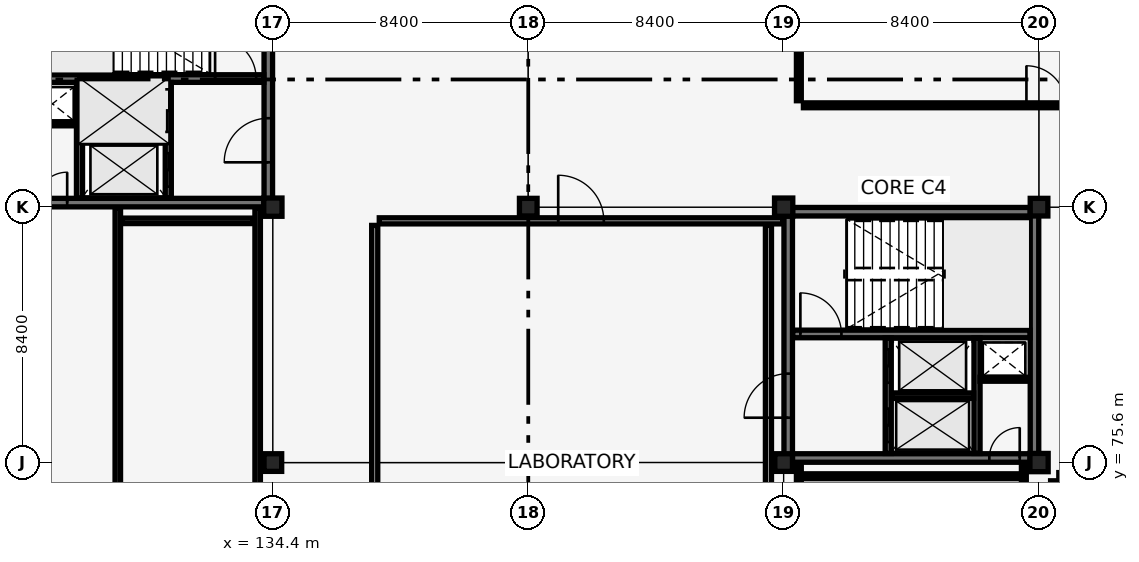
"""IFC4 building model, lengths in metres.
Left out: names, types, materials, properties, quantities, classifications, styles, units other than length and angle.
Written with IfcOpenShell. Run it as: python <this file> out.ifc"""

import sys

from ifc_helpers import new_model, si_unit, direction, frame, frame_2d, origin, origin_2d, place, context, subcontext, project, spatial, rectangle, extrude, element, fill, save


model = new_model("IFC4")
c1 = context("Model", 3, precision=1e-05, world=origin(), true_north=direction((0.0, 1.0)))
c2 = subcontext(c1, "Body", "Model", "MODEL_VIEW")
j1 = project(units=[si_unit("LENGTHUNIT", "METRE"), si_unit("PLANEANGLEUNIT", "RADIAN")], contexts=[c1])
p1 = place(None, origin())
s1 = spatial("IfcSite", under=j1, at=p1, CompositionType="ELEMENT")
p2 = place(p1, origin())
s2 = spatial("IfcBuilding", under=s1, at=p2, CompositionType="ELEMENT")
p3 = place(p2, frame((0.0, 0.0, 18.02)))
s3 = spatial("IfcBuildingStorey", under=s2, at=p3, CompositionType="ELEMENT", Elevation=18.02)
p4 = place(p3, frame((126.15, 84.15, 0.0), z_axis=(0.0, 0.0, 1.0), x_axis=(1.0, 0.0, 0.0)))
e1 = element("IfcWall", 1, at=p4, inside=s3, PredefinedType="SHEAR", context=c2, shape_type="SweptSolid", body=[
    extrude(rectangle(XDim=8.1, YDim=0.28, at=frame_2d((4.05, 0.0))), origin(), (0.0, 0.0, 1.0), 3.78),
])
p5 = place(p4, frame((0.485, 0.0, 0.0)))
e2 = element("IfcOpeningElement", 2, at=p5, cuts=e1, PredefinedType="OPENING", context=c2, shape_type="SweptSolid", body=[
    extrude(rectangle(XDim=1.0, YDim=2.15, at=frame_2d((0.5, 1.075))), frame((0.0, 0.15, 0.0), z_axis=(0.0, -1.0, 0.0), x_axis=(1.0, 0.0, 0.0)), (0.0, 0.0, 1.0), 0.3),
])
p6 = place(p3, frame((134.25, 84.15, 0.0), z_axis=(0.0, 0.0, 1.0), x_axis=(0.0, 1.0, 0.0)))
e3 = element("IfcWall", 3, at=p6, inside=s3, PredefinedType="SHEAR", context=c2, shape_type="SweptSolid", body=[
    extrude(rectangle(XDim=8.1, YDim=0.28, at=frame_2d((4.05, 0.0))), origin(), (0.0, 0.0, 1.0), 3.78),
])
p7 = place(p6, frame((1.325, 0.0, 0.0)))
e4 = element("IfcOpeningElement", 4, at=p7, cuts=e3, PredefinedType="OPENING", context=c2, shape_type="SweptSolid", body=[
    extrude(rectangle(XDim=1.45, YDim=2.15, at=frame_2d((0.725, 1.075))), frame((0.0, 0.15, 0.0), z_axis=(0.0, -1.0, 0.0), x_axis=(1.0, 0.0, 0.0)), (0.0, 0.0, 1.0), 0.3),
])
p8 = place(p3, frame((126.3, 88.23, 0.0), z_axis=(0.0, 0.0, 1.0), x_axis=(1.0, 0.0, 0.0)))
e5 = element("IfcWall", 5, at=p8, inside=s3, PredefinedType="SHEAR", context=c2, shape_type="SweptSolid", body=[
    extrude(rectangle(XDim=7.8, YDim=0.25, at=frame_2d((3.9, 0.0))), origin(), (0.0, 0.0, 1.0), 3.78),
])
p9 = place(p8, frame((6.2, 0.0, 0.0)))
e6 = element("IfcOpeningElement", 6, at=p9, cuts=e5, PredefinedType="OPENING", context=c2, shape_type="SweptSolid", body=[
    extrude(rectangle(XDim=1.35, YDim=2.15, at=frame_2d((0.675, 1.075))), frame((0.0, 0.135, 0.0), z_axis=(0.0, -1.0, 0.0), x_axis=(1.0, 0.0, 0.0)), (0.0, 0.0, 1.0), 0.27),
])
p10 = place(p3, frame((151.35, 75.75, 0.0), z_axis=(0.0, 0.0, 1.0), x_axis=(1.0, 0.0, 0.0)))
e7 = element("IfcWall", 7, at=p10, inside=s3, PredefinedType="SHEAR", context=c2, shape_type="SweptSolid", body=[
    extrude(rectangle(XDim=8.1, YDim=0.28, at=frame_2d((4.05, 0.0))), origin(), (0.0, 0.0, 1.0), 3.78),
])
p11 = place(p10, frame((6.615, 0.0, 0.0)))
e8 = element("IfcOpeningElement", 8, at=p11, cuts=e7, PredefinedType="OPENING", context=c2, shape_type="SweptSolid", body=[
    extrude(rectangle(XDim=1.0, YDim=2.15, at=frame_2d((0.5, 1.075))), frame((0.0, 0.15, 0.0), z_axis=(0.0, -1.0, 0.0), x_axis=(1.0, 0.0, 0.0)), (0.0, 0.0, 1.0), 0.3),
])
p12 = place(p3, frame((151.35, 83.85, 0.0), z_axis=(0.0, 0.0, 1.0), x_axis=(1.0, 0.0, 0.0)))
e9 = element("IfcWall", 9, at=p12, inside=s3, PredefinedType="SHEAR", context=c2, shape_type="SweptSolid", body=[
    extrude(rectangle(XDim=8.1, YDim=0.28, at=frame_2d((4.05, 0.0))), origin(), (0.0, 0.0, 1.0), 3.78),
])
p13 = place(p3, frame((151.35, 75.75, 0.0), z_axis=(0.0, 0.0, 1.0), x_axis=(0.0, 1.0, 0.0)))
e10 = element("IfcWall", 10, at=p13, inside=s3, PredefinedType="SHEAR", context=c2, shape_type="SweptSolid", body=[
    extrude(rectangle(XDim=8.1, YDim=0.28, at=frame_2d((4.05, 0.0))), origin(), (0.0, 0.0, 1.0), 3.78),
])
p14 = place(p13, frame((1.325, 0.0, 0.0)))
e11 = element("IfcOpeningElement", 11, at=p14, cuts=e10, PredefinedType="OPENING", context=c2, shape_type="SweptSolid", body=[
    extrude(rectangle(XDim=1.45, YDim=2.15, at=frame_2d((0.725, 1.075))), frame((0.0, 0.15, 0.0), z_axis=(0.0, -1.0, 0.0), x_axis=(1.0, 0.0, 0.0)), (0.0, 0.0, 1.0), 0.3),
])
p15 = place(p3, frame((159.45, 75.75, 0.0), z_axis=(0.0, 0.0, 1.0), x_axis=(0.0, 1.0, 0.0)))
e12 = element("IfcWall", 12, at=p15, inside=s3, PredefinedType="SHEAR", context=c2, shape_type="SweptSolid", body=[
    extrude(rectangle(XDim=8.1, YDim=0.28, at=frame_2d((4.05, 0.0))), origin(), (0.0, 0.0, 1.0), 3.78),
])
p16 = place(p3, frame((151.5, 79.83, 0.0), z_axis=(0.0, 0.0, 1.0), x_axis=(1.0, 0.0, 0.0)))
e13 = element("IfcWall", 13, at=p16, inside=s3, PredefinedType="SHEAR", context=c2, shape_type="SweptSolid", body=[
    extrude(rectangle(XDim=7.8, YDim=0.25, at=frame_2d((3.9, 0.0))), origin(), (0.0, 0.0, 1.0), 3.78),
])
p17 = place(p16, frame((0.25, 0.0, 0.0)))
e14 = element("IfcOpeningElement", 14, at=p17, cuts=e13, PredefinedType="OPENING", context=c2, shape_type="SweptSolid", body=[
    extrude(rectangle(XDim=1.35, YDim=2.15, at=frame_2d((0.675, 1.075))), frame((0.0, 0.135, 0.0), z_axis=(0.0, -1.0, 0.0), x_axis=(1.0, 0.0, 0.0)), (0.0, 0.0, 1.0), 0.27),
])
p18 = place(p3, frame((134.4, 75.6, 0.0), z_axis=(0.0, 0.0, 1.0), x_axis=(1.0, 0.0, 0.0)))
e15 = element("IfcColumn", 15, at=p18, inside=s3, PredefinedType="COLUMN", context=c2, shape_type="SweptSolid", body=[
    extrude(rectangle(XDim=0.58, YDim=0.58, at=origin_2d()), origin(), (0.0, 0.0, 1.0), 3.78),
])
for number, where, z_axis, x_axis in (
    (16, (134.4, 84.0, 0.0), (0.0, 0.0, 1.0), (1.0, 0.0, 0.0)),
    (17, (142.8, 75.6, 0.0), (0.0, 0.0, 1.0), (1.0, 0.0, 0.0)),
):
    element("IfcColumn", number, at=place(p3, frame(where, z_axis=z_axis, x_axis=x_axis)), inside=s3, PredefinedType="COLUMN", context=c2, shape_type="SweptSolid", body=[
        extrude(rectangle(XDim=0.6, YDim=0.6, at=origin_2d()), origin(), (0.0, 0.0, 1.0), 3.78),
    ])
for number, where, z_axis, x_axis in (
    (18, (142.8, 84.0, 0.0), (0.0, 0.0, 1.0), (1.0, 0.0, 0.0)),
    (19, (151.2, 75.6, 0.0), (0.0, 0.0, 1.0), (1.0, 0.0, 0.0)),
):
    element("IfcColumn", number, at=place(p3, frame(where, z_axis=z_axis, x_axis=x_axis)), inside=s3, PredefinedType="COLUMN", context=c2, shape_type="SweptSolid", body=[
        extrude(rectangle(XDim=0.58, YDim=0.58, at=origin_2d()), origin(), (0.0, 0.0, 1.0), 3.78),
    ])
for number, where, z_axis, x_axis in (
    (20, (151.2, 84.0, 0.0), (0.0, 0.0, 1.0), (1.0, 0.0, 0.0)),
    (21, (159.6, 75.6, 0.0), (0.0, 0.0, 1.0), (1.0, 0.0, 0.0)),
):
    element("IfcColumn", number, at=place(p3, frame(where, z_axis=z_axis, x_axis=x_axis)), inside=s3, PredefinedType="COLUMN", context=c2, shape_type="SweptSolid", body=[
        extrude(rectangle(XDim=0.6, YDim=0.6, at=origin_2d()), origin(), (0.0, 0.0, 1.0), 3.78),
    ])
p19 = place(p3, frame((159.6, 84.0, 0.0), z_axis=(0.0, 0.0, 1.0), x_axis=(1.0, 0.0, 0.0)))
e22 = element("IfcColumn", 22, at=p19, inside=s3, PredefinedType="COLUMN", context=c2, shape_type="SweptSolid", body=[
    extrude(rectangle(XDim=0.58, YDim=0.58, at=origin_2d()), origin(), (0.0, 0.0, 1.0), 3.78),
])
p20 = place(p3, frame((130.96, 84.3, 0.0), z_axis=(0.0, 0.0, 1.0), x_axis=(0.0, 1.0, 0.0)))
e23 = element("IfcWall", 23, at=p20, inside=s3, PredefinedType="SHEAR", context=c2, shape_type="SweptSolid", body=[
    extrude(rectangle(XDim=3.8, YDim=0.2, at=frame_2d((1.9, 0.0))), origin(), (0.0, 0.0, 1.0), 3.08),
])
p21 = place(p20, frame((0.375, 0.0, 0.0)))
e24 = element("IfcOpeningElement", 24, at=p21, cuts=e23, PredefinedType="OPENING", context=c2, shape_type="SweptSolid", body=[
    extrude(rectangle(XDim=1.1, YDim=2.15, at=frame_2d((0.55, 1.075))), frame((0.0, 0.11, 0.0), z_axis=(0.0, -1.0, 0.0), x_axis=(1.0, 0.0, 0.0)), (0.0, 0.0, 1.0), 0.22),
])
p22 = place(p20, frame((2.175, 0.0, 0.0)))
e25 = element("IfcOpeningElement", 25, at=p22, cuts=e23, PredefinedType="OPENING", context=c2, shape_type="SweptSolid", body=[
    extrude(rectangle(XDim=1.4, YDim=2.2, at=frame_2d((0.7, 1.1))), frame((0.0, 0.11, 0.0), z_axis=(0.0, -1.0, 0.0), x_axis=(1.0, 0.0, 0.0)), (0.0, 0.0, 1.0), 0.22),
])
p23 = place(p3, frame((128.04, 84.3, 0.0), z_axis=(0.0, 0.0, 1.0), x_axis=(0.0, 1.0, 0.0)))
e26 = element("IfcWall", 26, at=p23, inside=s3, PredefinedType="SHEAR", context=c2, shape_type="SweptSolid", body=[
    extrude(rectangle(XDim=3.8, YDim=0.2, at=frame_2d((1.9, 0.0))), origin(), (0.0, 0.0, 1.0), 3.08),
])
p24 = place(p3, frame((128.15, 86.2, 0.0), z_axis=(0.0, 0.0, 1.0), x_axis=(1.0, 0.0, 0.0)))
e27 = element("IfcWall", 27, at=p24, inside=s3, PredefinedType="SHEAR", context=c2, shape_type="SweptSolid", body=[
    extrude(rectangle(XDim=2.7, YDim=0.18, at=frame_2d((1.35, 0.0))), origin(), (0.0, 0.0, 1.0), 3.78),
])
p25 = place(p3, frame((126.32, 86.74, 0.0), z_axis=(0.0, 0.0, 1.0), x_axis=(1.0, 0.0, 0.0)))
e28 = element("IfcWall", 28, at=p25, inside=s3, PredefinedType="PARTITIONING", context=c2, shape_type="SweptSolid", body=[
    extrude(rectangle(XDim=1.62, YDim=0.13, at=frame_2d((0.81, 0.0))), origin(), (0.0, 0.0, 1.0), 3.78),
])
p26 = place(p3, frame((154.64, 75.9, 0.0), z_axis=(0.0, 0.0, 1.0), x_axis=(0.0, 1.0, 0.0)))
e29 = element("IfcWall", 29, at=p26, inside=s3, PredefinedType="SHEAR", context=c2, shape_type="SweptSolid", body=[
    extrude(rectangle(XDim=3.8, YDim=0.2, at=frame_2d((1.9, 0.0))), origin(), (0.0, 0.0, 1.0), 3.78),
])
p27 = place(p26, frame((0.375, 0.0, 0.0)))
e30 = element("IfcOpeningElement", 30, at=p27, cuts=e29, PredefinedType="OPENING", context=c2, shape_type="SweptSolid", body=[
    extrude(rectangle(XDim=1.1, YDim=2.15, at=frame_2d((0.55, 1.075))), frame((0.0, 0.11, 0.0), z_axis=(0.0, -1.0, 0.0), x_axis=(1.0, 0.0, 0.0)), (0.0, 0.0, 1.0), 0.22),
])
p28 = place(p26, frame((2.325, 0.0, 0.0)))
e31 = element("IfcOpeningElement", 31, at=p28, cuts=e29, PredefinedType="OPENING", context=c2, shape_type="SweptSolid", body=[
    extrude(rectangle(XDim=1.1, YDim=2.15, at=frame_2d((0.55, 1.075))), frame((0.0, 0.11, 0.0), z_axis=(0.0, -1.0, 0.0), x_axis=(1.0, 0.0, 0.0)), (0.0, 0.0, 1.0), 0.22),
])
p29 = place(p3, frame((157.56, 75.9, 0.0), z_axis=(0.0, 0.0, 1.0), x_axis=(0.0, 1.0, 0.0)))
e32 = element("IfcWall", 32, at=p29, inside=s3, PredefinedType="SHEAR", context=c2, shape_type="SweptSolid", body=[
    extrude(rectangle(XDim=3.8, YDim=0.2, at=frame_2d((1.9, 0.0))), origin(), (0.0, 0.0, 1.0), 3.78),
])
p30 = place(p3, frame((154.75, 77.8, 0.0), z_axis=(0.0, 0.0, 1.0), x_axis=(1.0, 0.0, 0.0)))
e33 = element("IfcWall", 33, at=p30, inside=s3, PredefinedType="SHEAR", context=c2, shape_type="SweptSolid", body=[
    extrude(rectangle(XDim=2.7, YDim=0.18, at=frame_2d((1.35, 0.0))), origin(), (0.0, 0.0, 1.0), 3.78),
])
p31 = place(p3, frame((157.66, 78.34, 0.0), z_axis=(0.0, 0.0, 1.0), x_axis=(1.0, 0.0, 0.0)))
e34 = element("IfcWall", 34, at=p31, inside=s3, PredefinedType="PARTITIONING", context=c2, shape_type="SweptSolid", body=[
    extrude(rectangle(XDim=1.62, YDim=0.13, at=frame_2d((0.81, 0.0))), origin(), (0.0, 0.0, 1.0), 3.78),
])
p32 = place(p3, frame((160.1, 34.2, 0.0), z_axis=(0.0, 0.0, 1.0), x_axis=(0.0, 1.0, 0.0)))
e35 = element("IfcWall", 35, at=p32, inside=s3, PredefinedType="PARTITIONING", context=c2, shape_type="SweptSolid", body=[
    extrude(rectangle(XDim=40.8, YDim=0.24, at=frame_2d((20.4, 0.0))), origin(), (0.0, 0.0, 1.0), 3.08),
])
p33 = place(p32, frame((19.85, 0.0, 0.0)))
e36 = element("IfcOpeningElement", 36, at=p33, cuts=e35, PredefinedType="OPENING", context=c2, shape_type="SweptSolid", body=[
    extrude(rectangle(XDim=1.1, YDim=2.15, at=frame_2d((0.55, 1.075))), frame((0.0, 0.13, 0.0), z_axis=(0.0, -1.0, 0.0), x_axis=(1.0, 0.0, 0.0)), (0.0, 0.0, 1.0), 0.26),
])
p34 = place(p3, frame((160.25, 75.15, 0.0), z_axis=(0.0, 0.0, 1.0), x_axis=(1.0, 0.0, 0.0)))
e37 = element("IfcWall", 37, at=p34, inside=s3, PredefinedType="PARTITIONING", context=c2, shape_type="SweptSolid", body=[
    extrude(rectangle(XDim=7.57, YDim=0.24, at=frame_2d((3.785, 0.0))), origin(), (0.0, 0.0, 1.0), 3.18),
])
p35 = place(p3, frame((129.45, 83.55, 0.0), z_axis=(0.0, 0.0, 1.0), x_axis=(1.0, 0.0, 0.0)))
e38 = element("IfcWall", 38, at=p35, inside=s3, PredefinedType="PARTITIONING", context=c2, shape_type="SweptSolid", body=[
    extrude(rectangle(XDim=4.3, YDim=0.18, at=frame_2d((2.15, 0.0))), origin(), (0.0, 0.0, 1.0), 3.78),
])
for number, where, z_axis, x_axis in (
    (39, (129.3, 36.7, 0.0), (0.0, 0.0, 1.0), (0.0, 1.0, 0.0)),
    (40, (133.9, 36.7, 0.0), (0.0, 0.0, 1.0), (0.0, 1.0, 0.0)),
):
    element("IfcWall", number, at=place(p3, frame(where, z_axis=z_axis, x_axis=x_axis)), inside=s3, PredefinedType="PARTITIONING", context=c2, shape_type="SweptSolid", body=[
        extrude(rectangle(XDim=47.27, YDim=0.18, at=frame_2d((23.635, 0.0))), origin(), (0.0, 0.0, 1.0), 3.08),
    ])
p36 = place(p3, frame((151.85, 87.35, 0.0), z_axis=(0.0, 0.0, 1.0), x_axis=(1.0, 0.0, 0.0)))
e41 = element("IfcWall", 41, at=p36, inside=s3, PredefinedType="PARTITIONING", context=c2, shape_type="SweptSolid", body=[
    extrude(rectangle(XDim=15.97, YDim=0.16, at=frame_2d((7.985, 0.0))), origin(), (0.0, 0.0, 1.0), 3.18),
])
p37 = place(p36, frame((7.335, 0.0, 0.0)))
e42 = element("IfcOpeningElement", 42, at=p37, cuts=e41, PredefinedType="OPENING", context=c2, shape_type="SweptSolid", body=[
    extrude(rectangle(XDim=1.3, YDim=2.2, at=frame_2d((0.65, 1.1))), frame((0.0, 0.09, 0.0), z_axis=(0.0, -1.0, 0.0), x_axis=(1.0, 0.0, 0.0)), (0.0, 0.0, 1.0), 0.18),
])
p38 = place(p3, frame((151.7, 87.5, 0.0), z_axis=(0.0, 0.0, 1.0), x_axis=(0.0, 1.0, 0.0)))
e43 = element("IfcWall", 43, at=p38, inside=s3, PredefinedType="PARTITIONING", context=c2, shape_type="SweptSolid", body=[
    extrude(rectangle(XDim=29.92, YDim=0.16, at=frame_2d((14.96, 0.0))), origin(), (0.0, 0.0, 1.0), 3.16),
])
p39 = place(p3, frame((137.9, 83.55, 0.0), z_axis=(0.0, 0.0, 1.0), x_axis=(1.0, 0.0, 0.0)))
e44 = element("IfcWall", 44, at=p39, inside=s3, PredefinedType="PARTITIONING", context=c2, shape_type="SweptSolid", body=[
    extrude(rectangle(XDim=13.27, YDim=0.2, at=frame_2d((6.635, 0.0))), origin(), (0.0, 0.0, 1.0), 3.13),
])
p40 = place(p39, frame((5.885, 0.0, 0.0)))
e45 = element("IfcOpeningElement", 45, at=p40, cuts=e44, PredefinedType="OPENING", context=c2, shape_type="SweptSolid", body=[
    extrude(rectangle(XDim=1.5, YDim=2.2, at=frame_2d((0.75, 1.1))), frame((0.0, 0.11, 0.0), z_axis=(0.0, -1.0, 0.0), x_axis=(1.0, 0.0, 0.0)), (0.0, 0.0, 1.0), 0.22),
])
for number, where, z_axis, x_axis in (
    (46, (137.75, 67.8, 0.0), (0.0, 0.0, 1.0), (0.0, 1.0, 0.0)),
    (47, (150.7, 67.8, 0.0), (0.0, 0.0, 1.0), (0.0, 1.0, 0.0)),
):
    element("IfcWall", number, at=place(p3, frame(where, z_axis=z_axis, x_axis=x_axis)), inside=s3, PredefinedType="PARTITIONING", context=c2, shape_type="SweptSolid", body=[
        extrude(rectangle(XDim=15.6, YDim=0.2, at=frame_2d((7.8, 0.0))), origin(), (0.0, 0.0, 1.0), 3.16),
    ])
p41 = place(p3, frame((151.85, 75.15, 0.0), z_axis=(0.0, 0.0, 1.0), x_axis=(1.0, 0.0, 0.0)))
e48 = element("IfcWall", 48, at=p41, inside=s3, PredefinedType="PARTITIONING", context=c2, shape_type="SweptSolid", body=[
    extrude(rectangle(XDim=7.1, YDim=0.16, at=frame_2d((3.55, 0.0))), origin(), (0.0, 0.0, 1.0), 3.78),
])
for number, where, z_axis, x_axis in (
    (49, (151.7, 45.1, 0.0), (0.0, 0.0, 1.0), (0.0, 1.0, 0.0)),
    (50, (159.1, 45.1, 0.0), (0.0, 0.0, 1.0), (0.0, 1.0, 0.0)),
):
    element("IfcWall", number, at=place(p3, frame(where, z_axis=z_axis, x_axis=x_axis)), inside=s3, PredefinedType="PARTITIONING", context=c2, shape_type="SweptSolid", body=[
        extrude(rectangle(XDim=30.47, YDim=0.16, at=frame_2d((15.235, 0.0))), origin(), (0.0, 0.0, 1.0), 3.08),
    ])
p42 = place(p9, origin())
e51 = element("IfcDoor", 51, at=p42, inside=s3, OperationType="SINGLE_SWING_LEFT", PredefinedType="DOOR", context=c2, shape_type="SweptSolid", body=[
    extrude(rectangle(XDim=1.35, YDim=2.15, at=frame_2d((0.675, 1.075))), frame((0.0, 0.025, 0.0), z_axis=(0.0, -1.0, 0.0), x_axis=(1.0, 0.0, 0.0)), (0.0, 0.0, 1.0), 0.05),
])
fill(e6, e51)
p43 = place(p21, origin())
e52 = element("IfcDoor", 52, at=p43, inside=s3, OperationType="SLIDING_TO_LEFT", PredefinedType="DOOR", context=c2, shape_type="SweptSolid", body=[
    extrude(rectangle(XDim=1.1, YDim=2.15, at=frame_2d((0.55, 1.075))), frame((0.0, 0.025, 0.0), z_axis=(0.0, -1.0, 0.0), x_axis=(1.0, 0.0, 0.0)), (0.0, 0.0, 1.0), 0.05),
])
fill(e24, e52)
p44 = place(p22, origin())
e53 = element("IfcDoor", 53, at=p44, inside=s3, OperationType="SLIDING_TO_LEFT", PredefinedType="DOOR", context=c2, shape_type="SweptSolid", body=[
    extrude(rectangle(XDim=1.4, YDim=2.2, at=frame_2d((0.7, 1.1))), frame((0.0, 0.025, 0.0), z_axis=(0.0, -1.0, 0.0), x_axis=(1.0, 0.0, 0.0)), (0.0, 0.0, 1.0), 0.05),
])
fill(e25, e53)
p45 = place(p7, origin())
e54 = element("IfcDoor", 54, at=p45, inside=s3, OperationType="DOUBLE_DOOR_SINGLE_SWING", PredefinedType="DOOR", context=c2, shape_type="SweptSolid", body=[
    extrude(rectangle(XDim=1.45, YDim=2.15, at=frame_2d((0.725, 1.075))), frame((0.0, 0.025, 0.0), z_axis=(0.0, -1.0, 0.0), x_axis=(1.0, 0.0, 0.0)), (0.0, 0.0, 1.0), 0.05),
])
fill(e4, e54)
p46 = place(p5, origin())
e55 = element("IfcDoor", 55, at=p46, inside=s3, OperationType="SINGLE_SWING_RIGHT", PredefinedType="DOOR", context=c2, shape_type="SweptSolid", body=[
    extrude(rectangle(XDim=1.0, YDim=2.15, at=frame_2d((0.5, 1.075))), frame((0.0, 0.025, 0.0), z_axis=(0.0, -1.0, 0.0), x_axis=(1.0, 0.0, 0.0)), (0.0, 0.0, 1.0), 0.05),
])
fill(e2, e55)
p47 = place(p17, origin())
e56 = element("IfcDoor", 56, at=p47, inside=s3, OperationType="SINGLE_SWING_LEFT", PredefinedType="DOOR", context=c2, shape_type="SweptSolid", body=[
    extrude(rectangle(XDim=1.35, YDim=2.15, at=frame_2d((0.675, 1.075))), frame((0.0, 0.025, 0.0), z_axis=(0.0, -1.0, 0.0), x_axis=(1.0, 0.0, 0.0)), (0.0, 0.0, 1.0), 0.05),
])
fill(e14, e56)
p48 = place(p27, origin())
e57 = element("IfcDoor", 57, at=p48, inside=s3, OperationType="SLIDING_TO_LEFT", PredefinedType="DOOR", context=c2, shape_type="SweptSolid", body=[
    extrude(rectangle(XDim=1.1, YDim=2.15, at=frame_2d((0.55, 1.075))), frame((0.0, 0.025, 0.0), z_axis=(0.0, -1.0, 0.0), x_axis=(1.0, 0.0, 0.0)), (0.0, 0.0, 1.0), 0.05),
])
fill(e30, e57)
p49 = place(p28, origin())
e58 = element("IfcDoor", 58, at=p49, inside=s3, OperationType="SLIDING_TO_LEFT", PredefinedType="DOOR", context=c2, shape_type="SweptSolid", body=[
    extrude(rectangle(XDim=1.1, YDim=2.15, at=frame_2d((0.55, 1.075))), frame((0.0, 0.025, 0.0), z_axis=(0.0, -1.0, 0.0), x_axis=(1.0, 0.0, 0.0)), (0.0, 0.0, 1.0), 0.05),
])
fill(e31, e58)
p50 = place(p14, origin())
e59 = element("IfcDoor", 59, at=p50, inside=s3, OperationType="DOUBLE_DOOR_SINGLE_SWING", PredefinedType="DOOR", context=c2, shape_type="SweptSolid", body=[
    extrude(rectangle(XDim=1.45, YDim=2.15, at=frame_2d((0.725, 1.075))), frame((0.0, 0.025, 0.0), z_axis=(0.0, -1.0, 0.0), x_axis=(1.0, 0.0, 0.0)), (0.0, 0.0, 1.0), 0.05),
])
fill(e11, e59)
p51 = place(p11, origin())
e60 = element("IfcDoor", 60, at=p51, inside=s3, OperationType="SINGLE_SWING_RIGHT", PredefinedType="DOOR", context=c2, shape_type="SweptSolid", body=[
    extrude(rectangle(XDim=1.0, YDim=2.15, at=frame_2d((0.5, 1.075))), frame((0.0, 0.025, 0.0), z_axis=(0.0, -1.0, 0.0), x_axis=(1.0, 0.0, 0.0)), (0.0, 0.0, 1.0), 0.05),
])
fill(e8, e60)
p52 = place(p37, origin())
e61 = element("IfcDoor", 61, at=p52, inside=s3, OperationType="SINGLE_SWING_LEFT", PredefinedType="DOOR", context=c2, shape_type="SweptSolid", body=[
    extrude(rectangle(XDim=1.3, YDim=2.2, at=frame_2d((0.65, 1.1))), frame((0.0, 0.025, 0.0), z_axis=(0.0, -1.0, 0.0), x_axis=(1.0, 0.0, 0.0)), (0.0, 0.0, 1.0), 0.05),
])
fill(e42, e61)
p53 = place(p40, origin())
e62 = element("IfcDoor", 62, at=p53, inside=s3, OperationType="DOUBLE_DOOR_SINGLE_SWING", PredefinedType="DOOR", context=c2, shape_type="SweptSolid", body=[
    extrude(rectangle(XDim=1.5, YDim=2.2, at=frame_2d((0.75, 1.1))), frame((0.0, 0.025, 0.0), z_axis=(0.0, -1.0, 0.0), x_axis=(1.0, 0.0, 0.0)), (0.0, 0.0, 1.0), 0.05),
])
fill(e45, e62)
save(model, sys.argv[1])
